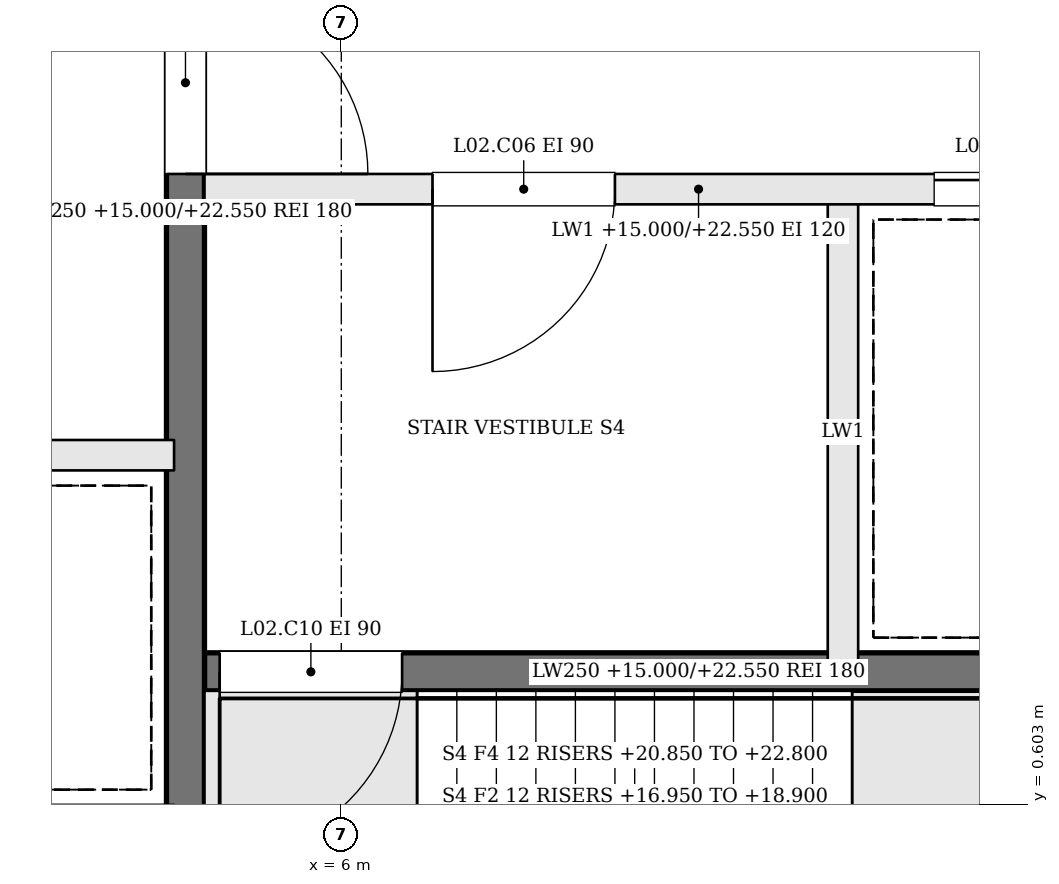
"""IFC4 building model, lengths in metres.
Left out: names, types, materials, properties, quantities, classifications, styles, units other than length and angle.
Written with IfcOpenShell. Run it as: python <this file> out.ifc"""

import sys

from ifc_helpers import new_model, si_unit, direction, frame, frame_2d, origin, place, context, subcontext, project, spatial, rectangle, extrude, element, fill, save


model = new_model("IFC4")
c1 = context("Model", 3, precision=1e-05, world=origin(), true_north=direction((0.0, 1.0)))
c2 = subcontext(c1, "Body", "Model", "MODEL_VIEW")
j1 = project(units=[si_unit("LENGTHUNIT", "METRE"), si_unit("PLANEANGLEUNIT", "RADIAN")], contexts=[c1])
p1 = place(None, origin())
s1 = spatial("IfcSite", under=j1, at=p1, CompositionType="ELEMENT")
p2 = place(p1, origin())
s2 = spatial("IfcBuilding", under=s1, at=p2, CompositionType="ELEMENT")
p3 = place(p2, frame((0.0, 0.0, 15.0)))
s3 = spatial("IfcBuildingStorey", under=s2, at=p3, CompositionType="ELEMENT", Elevation=15.0)
p4 = place(p3, frame((11.6, 4.65, 0.0), z_axis=(0.0, 0.0, 1.0), x_axis=(-1.0, 0.0, 0.0)))
e1 = element("IfcWall", 1, at=p4, inside=s3, PredefinedType="SOLIDWALL", context=c2, shape_type="SweptSolid", body=[
    extrude(rectangle(XDim=6.5, YDim=0.2, at=frame_2d((3.25, 0.0))), origin(), (0.0, 0.0, 1.0), 7.55),
])
p5 = place(p4, frame((3.8, 0.0, 0.0)))
e2 = element("IfcOpeningElement", 2, at=p5, cuts=e1, PredefinedType="OPENING", context=c2, shape_type="SweptSolid", body=[
    extrude(rectangle(XDim=1.2, YDim=2.1, at=frame_2d((0.6, 1.05))), frame((0.0, 0.11, 0.0), z_axis=(0.0, -1.0, 0.0), x_axis=(1.0, 0.0, 0.0)), (0.0, 0.0, 1.0), 0.22),
])
p6 = place(p4, frame((0.5, 0.0, 0.0)))
e3 = element("IfcOpeningElement", 3, at=p6, cuts=e1, PredefinedType="OPENING", context=c2, shape_type="SweptSolid", body=[
    extrude(rectangle(XDim=1.2, YDim=2.1, at=frame_2d((0.6, 1.05))), frame((0.0, 0.11, 0.0), z_axis=(0.0, -1.0, 0.0), x_axis=(1.0, 0.0, 0.0)), (0.0, 0.0, 1.0), 0.22),
])
p7 = place(p3, frame((11.6, 1.475, 0.0), z_axis=(0.0, 0.0, 1.0), x_axis=(-1.0, 0.0, 0.0)))
e4 = element("IfcWall", 4, at=p7, inside=s3, PredefinedType="SOLIDWALL", context=c2, shape_type="SweptSolid", body=[
    extrude(rectangle(XDim=6.5, YDim=0.25, at=frame_2d((3.25, 0.0))), origin(), (0.0, 0.0, 1.0), 7.55),
])
p8 = place(p7, frame((5.2, 0.0, 0.0)))
e5 = element("IfcOpeningElement", 5, at=p8, cuts=e4, PredefinedType="OPENING", context=c2, shape_type="SweptSolid", body=[
    extrude(rectangle(XDim=1.2, YDim=2.1, at=frame_2d((0.6, 1.05))), frame((0.0, 0.135, 0.0), z_axis=(0.0, -1.0, 0.0), x_axis=(1.0, 0.0, 0.0)), (0.0, 0.0, 1.0), 0.27),
])
p9 = place(p3, frame((9.3, 4.55, 0.0), z_axis=(0.0, 0.0, 1.0), x_axis=(0.0, -1.0, 0.0)))
e6 = element("IfcWall", 6, at=p9, inside=s3, PredefinedType="SOLIDWALL", context=c2, shape_type="SweptSolid", body=[
    extrude(rectangle(XDim=3.0, YDim=0.2, at=frame_2d((1.5, 0.0))), origin(), (0.0, 0.0, 1.0), 7.55),
])
p10 = place(p3, frame((4.975, 10.6, 0.0), z_axis=(0.0, 0.0, 1.0), x_axis=(0.0, -1.0, 0.0)))
e7 = element("IfcWall", 7, at=p10, inside=s3, PredefinedType="SOLIDWALL", context=c2, shape_type="SweptSolid", body=[
    extrude(rectangle(XDim=12.2, YDim=0.25, at=frame_2d((6.1, 0.0))), origin(), (0.0, 0.0, 1.0), 7.55),
])
p11 = place(p10, frame((4.65, 0.0, 0.0)))
e8 = element("IfcOpeningElement", 8, at=p11, cuts=e7, PredefinedType="OPENING", context=c2, shape_type="SweptSolid", body=[
    extrude(rectangle(XDim=1.2, YDim=2.1, at=frame_2d((0.6, 1.05))), frame((0.0, 0.135, 0.0), z_axis=(0.0, -1.0, 0.0), x_axis=(1.0, 0.0, 0.0)), (0.0, 0.0, 1.0), 0.27),
])
p12 = place(p3, frame((-4.9, 2.9, 0.0), z_axis=(0.0, 0.0, 1.0), x_axis=(1.0, 0.0, 0.0)))
e9 = element("IfcWall", 9, at=p12, inside=s3, PredefinedType="SOLIDWALL", context=c2, shape_type="SweptSolid", body=[
    extrude(rectangle(XDim=9.8, YDim=0.2, at=frame_2d((4.9, 0.0))), origin(), (0.0, 0.0, 1.0), 7.55),
])
p13 = place(p12, frame((0.675, 0.0, 0.0)))
e10 = element("IfcOpeningElement", 10, at=p13, cuts=e9, PredefinedType="OPENING", context=c2, shape_type="SweptSolid", body=[
    extrude(rectangle(XDim=1.1, YDim=2.1, at=frame_2d((0.55, 1.05))), frame((0.0, 0.11, 0.0), z_axis=(0.0, -1.0, 0.0), x_axis=(1.0, 0.0, 0.0)), (0.0, 0.0, 1.0), 0.22),
])
p14 = place(p12, frame((3.125, 0.0, 0.0)))
e11 = element("IfcOpeningElement", 11, at=p14, cuts=e9, PredefinedType="OPENING", context=c2, shape_type="SweptSolid", body=[
    extrude(rectangle(XDim=1.1, YDim=2.1, at=frame_2d((0.55, 1.05))), frame((0.0, 0.11, 0.0), z_axis=(0.0, -1.0, 0.0), x_axis=(1.0, 0.0, 0.0)), (0.0, 0.0, 1.0), 0.22),
])
p15 = place(p11, origin())
e12 = element("IfcDoor", 12, at=p15, inside=s3, OperationType="SINGLE_SWING_RIGHT", PredefinedType="DOOR", context=c2, shape_type="SweptSolid", body=[
    extrude(rectangle(XDim=1.2, YDim=2.1, at=frame_2d((0.6, 1.05))), frame((0.0, 0.025, 0.0), z_axis=(0.0, -1.0, 0.0), x_axis=(1.0, 0.0, 0.0)), (0.0, 0.0, 1.0), 0.05),
])
fill(e8, e12)
p16 = place(p5, origin())
e13 = element("IfcDoor", 13, at=p16, inside=s3, OperationType="SINGLE_SWING_RIGHT", PredefinedType="DOOR", context=c2, shape_type="SweptSolid", body=[
    extrude(rectangle(XDim=1.2, YDim=2.1, at=frame_2d((0.6, 1.05))), frame((0.0, 0.025, 0.0), z_axis=(0.0, -1.0, 0.0), x_axis=(1.0, 0.0, 0.0)), (0.0, 0.0, 1.0), 0.05),
])
fill(e2, e13)
p17 = place(p8, origin())
e14 = element("IfcDoor", 14, at=p17, inside=s3, OperationType="SINGLE_SWING_RIGHT", PredefinedType="DOOR", context=c2, shape_type="SweptSolid", body=[
    extrude(rectangle(XDim=1.2, YDim=2.1, at=frame_2d((0.6, 1.05))), frame((0.0, 0.025, 0.0), z_axis=(0.0, -1.0, 0.0), x_axis=(1.0, 0.0, 0.0)), (0.0, 0.0, 1.0), 0.05),
])
fill(e5, e14)
p18 = place(p6, origin())
e15 = element("IfcDoor", 15, at=p18, inside=s3, OperationType="SLIDING_TO_RIGHT", PredefinedType="DOOR", context=c2, shape_type="SweptSolid", body=[
    extrude(rectangle(XDim=1.2, YDim=2.1, at=frame_2d((0.6, 1.05))), frame((0.0, 0.025, 0.0), z_axis=(0.0, -1.0, 0.0), x_axis=(1.0, 0.0, 0.0)), (0.0, 0.0, 1.0), 0.05),
])
fill(e3, e15)
save(model, sys.argv[1])
